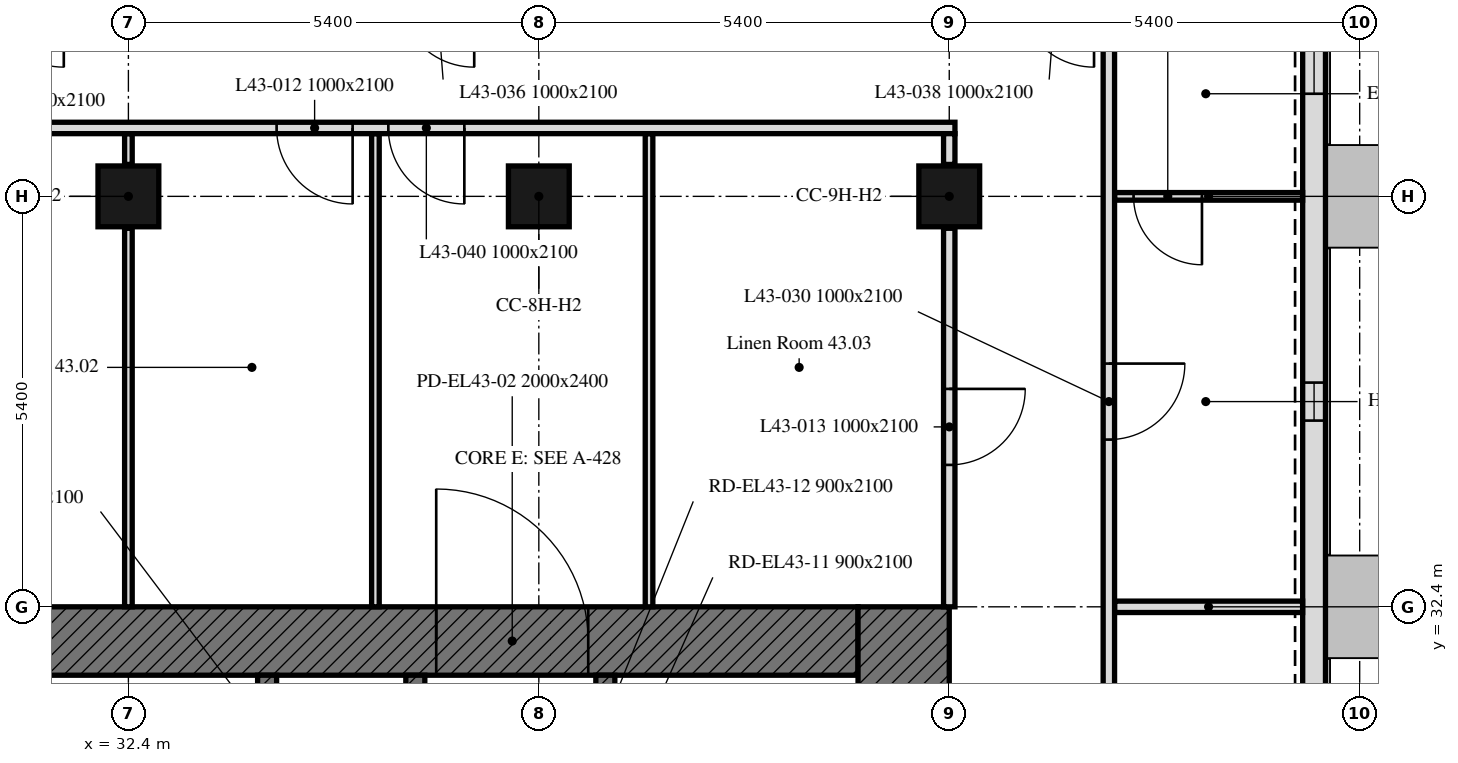
"""IFC4 building model, lengths in metres.
Left out: names, types, materials, properties, quantities, classifications, styles, units other than length and angle.
Written with IfcOpenShell. Run it as: python <this file> out.ifc"""

import sys

from ifc_helpers import new_model, si_unit, direction, frame, frame_2d, origin, origin_2d, place, context, subcontext, project, spatial, rectangle, extrude, element, fill, save


model = new_model("IFC4")
c1 = context("Model", 3, precision=1e-05, world=origin(), true_north=direction((0.0, 1.0)))
c2 = subcontext(c1, "Body", "Model", "MODEL_VIEW")
j1 = project(units=[si_unit("LENGTHUNIT", "METRE"), si_unit("PLANEANGLEUNIT", "RADIAN")], contexts=[c1])
p1 = place(None, origin())
s1 = spatial("IfcSite", under=j1, at=p1, CompositionType="ELEMENT")
p2 = place(p1, origin())
s2 = spatial("IfcBuilding", under=s1, at=p2, CompositionType="ELEMENT")
p3 = place(p2, frame((0.0, 0.0, 180.7)))
s3 = spatial("IfcBuildingStorey", under=s2, at=p3, CompositionType="ELEMENT", Elevation=180.7)
for number, where, z_axis, x_axis in (
    (1, (32.4, 37.8, 0.0), (0.0, 0.0, 1.0), (1.0, 0.0, 0.0)),
    (2, (37.8, 37.8, 0.0), (0.0, 0.0, 1.0), (1.0, 0.0, 0.0)),
    (3, (43.2, 37.8, 0.0), (0.0, 0.0, 1.0), (1.0, 0.0, 0.0)),
):
    element("IfcColumn", number, at=place(p3, frame(where, z_axis=z_axis, x_axis=x_axis)), inside=s3, PredefinedType="COLUMN", context=c2, shape_type="SweptSolid", body=[
        extrude(rectangle(XDim=0.8, YDim=0.8, at=origin_2d()), origin(), (0.0, 0.0, 1.0), 3.0),
    ])
p4 = place(p3, frame((48.0, 10.986, 0.0), z_axis=(0.0, 0.0, 1.0), x_axis=(0.0, 1.0, 0.0)))
e4 = element("IfcWall", 4, at=p4, inside=s3, PredefinedType="SOLIDWALL", context=c2, shape_type="SweptSolid", body=[
    extrude(rectangle(XDim=32.027, YDim=0.3, at=frame_2d((16.014, 0.0))), origin(), (0.0, 0.0, 1.0), 3.0),
])
p5 = place(p4, frame((1.164, 0.0, 0.9)))
e5 = element("IfcOpeningElement", 5, at=p5, cuts=e4, PredefinedType="OPENING", context=c2, shape_type="SweptSolid", body=[
    extrude(rectangle(XDim=1.1, YDim=1.7, at=frame_2d((0.55, 0.85))), frame((0.0, 0.16, 0.0), z_axis=(0.0, -1.0, 0.0), x_axis=(1.0, 0.0, 0.0)), (0.0, 0.0, 1.0), 0.32),
])
p6 = place(p4, frame((2.764, 0.0, 0.9)))
e6 = element("IfcOpeningElement", 6, at=p6, cuts=e4, PredefinedType="OPENING", context=c2, shape_type="SweptSolid", body=[
    extrude(rectangle(XDim=1.1, YDim=1.7, at=frame_2d((0.55, 0.85))), frame((0.0, 0.16, 0.0), z_axis=(0.0, -1.0, 0.0), x_axis=(1.0, 0.0, 0.0)), (0.0, 0.0, 1.0), 0.32),
])
p7 = place(p4, frame((7.664, 0.0, 0.9)))
e7 = element("IfcOpeningElement", 7, at=p7, cuts=e4, PredefinedType="OPENING", context=c2, shape_type="SweptSolid", body=[
    extrude(rectangle(XDim=0.5, YDim=1.7, at=frame_2d((0.25, 0.85))), frame((0.0, 0.16, 0.0), z_axis=(0.0, -1.0, 0.0), x_axis=(1.0, 0.0, 0.0)), (0.0, 0.0, 1.0), 0.32),
])
p8 = place(p4, frame((13.064, 0.0, 0.9)))
e8 = element("IfcOpeningElement", 8, at=p8, cuts=e4, PredefinedType="OPENING", context=c2, shape_type="SweptSolid", body=[
    extrude(rectangle(XDim=0.5, YDim=1.7, at=frame_2d((0.25, 0.85))), frame((0.0, 0.16, 0.0), z_axis=(0.0, -1.0, 0.0), x_axis=(1.0, 0.0, 0.0)), (0.0, 0.0, 1.0), 0.32),
])
p9 = place(p4, frame((18.464, 0.0, 0.9)))
e9 = element("IfcOpeningElement", 9, at=p9, cuts=e4, PredefinedType="OPENING", context=c2, shape_type="SweptSolid", body=[
    extrude(rectangle(XDim=0.5, YDim=1.7, at=frame_2d((0.25, 0.85))), frame((0.0, 0.16, 0.0), z_axis=(0.0, -1.0, 0.0), x_axis=(1.0, 0.0, 0.0)), (0.0, 0.0, 1.0), 0.32),
])
p10 = place(p4, frame((23.864, 0.0, 0.9)))
e10 = element("IfcOpeningElement", 10, at=p10, cuts=e4, PredefinedType="OPENING", context=c2, shape_type="SweptSolid", body=[
    extrude(rectangle(XDim=0.5, YDim=1.7, at=frame_2d((0.25, 0.85))), frame((0.0, 0.16, 0.0), z_axis=(0.0, -1.0, 0.0), x_axis=(1.0, 0.0, 0.0)), (0.0, 0.0, 1.0), 0.32),
])
p11 = place(p4, frame((28.164, 0.0, 0.9)))
e11 = element("IfcOpeningElement", 11, at=p11, cuts=e4, PredefinedType="OPENING", context=c2, shape_type="SweptSolid", body=[
    extrude(rectangle(XDim=1.1, YDim=1.7, at=frame_2d((0.55, 0.85))), frame((0.0, 0.16, 0.0), z_axis=(0.0, -1.0, 0.0), x_axis=(1.0, 0.0, 0.0)), (0.0, 0.0, 1.0), 0.32),
])
p12 = place(p4, frame((29.764, 0.0, 0.9)))
e12 = element("IfcOpeningElement", 12, at=p12, cuts=e4, PredefinedType="OPENING", context=c2, shape_type="SweptSolid", body=[
    extrude(rectangle(XDim=1.1, YDim=1.7, at=frame_2d((0.55, 0.85))), frame((0.0, 0.16, 0.0), z_axis=(0.0, -1.0, 0.0), x_axis=(1.0, 0.0, 0.0)), (0.0, 0.0, 1.0), 0.32),
])
p13 = place(p3, frame((30.9, 31.95, 0.0), z_axis=(0.0, 0.0, 1.0), x_axis=(1.0, 0.0, 0.0)))
e13 = element("IfcWall", 13, at=p13, inside=s3, PredefinedType="SOLIDWALL", context=c2, shape_type="SweptSolid", body=[
    extrude(rectangle(XDim=11.1, YDim=0.9, at=frame_2d((5.55, 0.0))), origin(), (0.0, 0.0, 1.0), 3.0),
])
p14 = place(p13, frame((5.55, 0.0, 0.0)))
e14 = element("IfcOpeningElement", 14, at=p14, cuts=e13, PredefinedType="OPENING", context=c2, shape_type="SweptSolid", body=[
    extrude(rectangle(XDim=2.0, YDim=2.4, at=frame_2d((1.0, 1.2))), frame((0.0, 0.45, 0.0), z_axis=(0.0, -1.0, 0.0), x_axis=(1.0, 0.0, 0.0)), (0.0, 0.0, 1.0), 0.9),
])
p15 = place(p3, frame((42.6, 32.4, 0.0), z_axis=(0.0, 0.0, 1.0), x_axis=(0.0, -1.0, 0.0)))
e15 = element("IfcWall", 15, at=p15, inside=s3, PredefinedType="SOLIDWALL", context=c2, shape_type="SweptSolid", body=[
    extrude(rectangle(XDim=16.2, YDim=1.2, at=frame_2d((8.1, 0.0))), origin(), (0.0, 0.0, 1.0), 3.0),
])
p16 = place(p3, frame((38.675, 17.1, 0.0), z_axis=(0.0, 0.0, 1.0), x_axis=(0.0, 1.0, 0.0)))
e16 = element("IfcWall", 16, at=p16, inside=s3, PredefinedType="SOLIDWALL", context=c2, shape_type="SweptSolid", body=[
    extrude(rectangle(XDim=14.4, YDim=0.25, at=frame_2d((7.2, 0.0))), origin(), (0.0, 0.0, 1.0), 3.0),
])
p17 = place(p16, frame((4.6, 0.0, 0.0)))
e17 = element("IfcOpeningElement", 17, at=p17, cuts=e16, PredefinedType="OPENING", context=c2, shape_type="SweptSolid", body=[
    extrude(rectangle(XDim=1.0, YDim=2.1, at=frame_2d((0.5, 1.05))), frame((0.0, 0.125, 0.0), z_axis=(0.0, -1.0, 0.0), x_axis=(1.0, 0.0, 0.0)), (0.0, 0.0, 1.0), 0.25),
])
p18 = place(p16, frame((7.062, 0.0, 0.0)))
e18 = element("IfcOpeningElement", 18, at=p18, cuts=e16, PredefinedType="OPENING", context=c2, shape_type="SweptSolid", body=[
    extrude(rectangle(XDim=1.2, YDim=2.1, at=frame_2d((0.6, 1.05))), frame((0.0, 0.125, 0.0), z_axis=(0.0, -1.0, 0.0), x_axis=(1.0, 0.0, 0.0)), (0.0, 0.0, 1.0), 0.25),
])
p19 = place(p16, frame((9.472, 0.0, 0.0)))
e19 = element("IfcOpeningElement", 19, at=p19, cuts=e16, PredefinedType="OPENING", context=c2, shape_type="SweptSolid", body=[
    extrude(rectangle(XDim=0.9, YDim=2.1, at=frame_2d((0.45, 1.05))), frame((0.0, 0.125, 0.0), z_axis=(0.0, -1.0, 0.0), x_axis=(1.0, 0.0, 0.0)), (0.0, 0.0, 1.0), 0.25),
])
p20 = place(p16, frame((10.779, 0.0, 0.0)))
e20 = element("IfcOpeningElement", 20, at=p20, cuts=e16, PredefinedType="OPENING", context=c2, shape_type="SweptSolid", body=[
    extrude(rectangle(XDim=0.9, YDim=2.1, at=frame_2d((0.45, 1.05))), frame((0.0, 0.125, 0.0), z_axis=(0.0, -1.0, 0.0), x_axis=(1.0, 0.0, 0.0)), (0.0, 0.0, 1.0), 0.25),
])
p21 = place(p16, frame((12.048, 0.0, 0.0)))
e21 = element("IfcOpeningElement", 21, at=p21, cuts=e16, PredefinedType="OPENING", context=c2, shape_type="SweptSolid", body=[
    extrude(rectangle(XDim=0.9, YDim=2.1, at=frame_2d((0.45, 1.05))), frame((0.0, 0.125, 0.0), z_axis=(0.0, -1.0, 0.0), x_axis=(1.0, 0.0, 0.0)), (0.0, 0.0, 1.0), 0.25),
])
p22 = place(p16, frame((13.354, 0.0, 0.0)))
e22 = element("IfcOpeningElement", 22, at=p22, cuts=e16, PredefinedType="OPENING", context=c2, shape_type="SweptSolid", body=[
    extrude(rectangle(XDim=0.9, YDim=2.1, at=frame_2d((0.45, 1.05))), frame((0.0, 0.125, 0.0), z_axis=(0.0, -1.0, 0.0), x_axis=(1.0, 0.0, 0.0)), (0.0, 0.0, 1.0), 0.25),
])
p23 = place(p3, frame((34.225, 17.1, 0.0), z_axis=(0.0, 0.0, 1.0), x_axis=(0.0, 1.0, 0.0)))
e23 = element("IfcWall", 23, at=p23, inside=s3, PredefinedType="SOLIDWALL", context=c2, shape_type="SweptSolid", body=[
    extrude(rectangle(XDim=14.4, YDim=0.25, at=frame_2d((7.2, 0.0))), origin(), (0.0, 0.0, 1.0), 3.0),
])
p24 = place(p23, frame((13.15, 0.0, 0.0)))
e24 = element("IfcOpeningElement", 24, at=p24, cuts=e23, PredefinedType="OPENING", context=c2, shape_type="SweptSolid", body=[
    extrude(rectangle(XDim=1.0, YDim=2.1, at=frame_2d((0.5, 1.05))), frame((0.0, 0.125, 0.0), z_axis=(0.0, -1.0, 0.0), x_axis=(1.0, 0.0, 0.0)), (0.0, 0.0, 1.0), 0.25),
])
p25 = place(p23, frame((0.6, 0.0, 0.0)))
e25 = element("IfcOpeningElement", 25, at=p25, cuts=e23, PredefinedType="OPENING", context=c2, shape_type="SweptSolid", body=[
    extrude(rectangle(XDim=1.1, YDim=2.1, at=frame_2d((0.55, 1.05))), frame((0.0, 0.125, 0.0), z_axis=(0.0, -1.0, 0.0), x_axis=(1.0, 0.0, 0.0)), (0.0, 0.0, 1.0), 0.25),
])
p26 = place(p23, frame((3.25, 0.0, 0.0)))
e26 = element("IfcOpeningElement", 26, at=p26, cuts=e23, PredefinedType="OPENING", context=c2, shape_type="SweptSolid", body=[
    extrude(rectangle(XDim=0.9, YDim=2.1, at=frame_2d((0.45, 1.05))), frame((0.0, 0.125, 0.0), z_axis=(0.0, -1.0, 0.0), x_axis=(1.0, 0.0, 0.0)), (0.0, 0.0, 1.0), 0.25),
])
p27 = place(p3, frame((36.175, 29.4, 0.0), z_axis=(0.0, 0.0, 1.0), x_axis=(0.0, 1.0, 0.0)))
e27 = element("IfcWall", 27, at=p27, inside=s3, PredefinedType="SOLIDWALL", context=c2, shape_type="SweptSolid", body=[
    extrude(rectangle(XDim=2.1, YDim=0.25, at=frame_2d((1.05, 0.0))), origin(), (0.0, 0.0, 1.0), 3.0),
])
p28 = place(p27, frame((0.5, 0.0, 0.0)))
e28 = element("IfcOpeningElement", 28, at=p28, cuts=e27, PredefinedType="OPENING", context=c2, shape_type="SweptSolid", body=[
    extrude(rectangle(XDim=1.0, YDim=2.1, at=frame_2d((0.5, 1.05))), frame((0.0, 0.125, 0.0), z_axis=(0.0, -1.0, 0.0), x_axis=(1.0, 0.0, 0.0)), (0.0, 0.0, 1.0), 0.25),
])
p29 = place(p3, frame((45.375, 32.4, 0.0), z_axis=(0.0, 0.0, 1.0), x_axis=(1.0, 0.0, 0.0)))
e29 = element("IfcWall", 29, at=p29, inside=s3, PredefinedType="PARTITIONING", context=c2, shape_type="SweptSolid", body=[
    extrude(rectangle(XDim=2.474, YDim=0.15, at=frame_2d((1.237, 0.0))), origin(), (0.0, 0.0, 1.0), 2.4),
])
p30 = place(p3, frame((47.849, 37.8, 0.0), z_axis=(0.0, 0.0, 1.0), x_axis=(-1.0, 0.0, 0.0)))
e30 = element("IfcWall", 30, at=p30, inside=s3, PredefinedType="PARTITIONING", context=c2, shape_type="SweptSolid", body=[
    extrude(rectangle(XDim=2.474, YDim=0.1, at=frame_2d((1.237, 0.0))), origin(), (0.0, 0.0, 1.0), 2.4),
])
p31 = place(p30, frame((1.324, 0.0, 0.0)))
e31 = element("IfcOpeningElement", 31, at=p31, cuts=e30, PredefinedType="OPENING", context=c2, shape_type="SweptSolid", body=[
    extrude(rectangle(XDim=0.9, YDim=2.1, at=frame_2d((0.45, 1.05))), frame((0.0, 0.05, 0.0), z_axis=(0.0, -1.0, 0.0), x_axis=(1.0, 0.0, 0.0)), (0.0, 0.0, 1.0), 0.1),
])
p32 = place(p3, frame((32.4, 32.4, 0.0), z_axis=(0.0, 0.0, 1.0), x_axis=(0.0, 1.0, 0.0)))
e32 = element("IfcWall", 32, at=p32, inside=s3, PredefinedType="PARTITIONING", context=c2, shape_type="SweptSolid", body=[
    extrude(rectangle(XDim=4.98, YDim=0.1, at=frame_2d((2.49, 0.0))), origin(), (0.0, 0.0, 1.0), 2.4),
])
p33 = place(p3, frame((32.4, 38.22, 0.0), z_axis=(0.0, 0.0, 1.0), x_axis=(0.0, 1.0, 0.0)))
e33 = element("IfcWall", 33, at=p33, inside=s3, PredefinedType="PARTITIONING", context=c2, shape_type="SweptSolid", body=[
    extrude(rectangle(XDim=0.405, YDim=0.1, at=frame_2d((0.203, 0.0))), origin(), (0.0, 0.0, 1.0), 2.4),
])
p34 = place(p3, frame((45.3, 40.425, 0.0), z_axis=(0.0, 0.0, 1.0), x_axis=(0.0, -1.0, 0.0)))
e34 = element("IfcWall", 34, at=p34, inside=s3, PredefinedType="PARTITIONING", context=c2, shape_type="SweptSolid", body=[
    extrude(rectangle(XDim=13.35, YDim=0.15, at=frame_2d((6.675, 0.0))), origin(), (0.0, 0.0, 1.0), 2.4),
])
p35 = place(p34, frame((10.225, 0.0, 0.0)))
e35 = element("IfcOpeningElement", 35, at=p35, cuts=e34, PredefinedType="OPENING", context=c2, shape_type="SweptSolid", body=[
    extrude(rectangle(XDim=1.0, YDim=2.1, at=frame_2d((0.5, 1.05))), frame((0.0, 0.075, 0.0), z_axis=(0.0, -1.0, 0.0), x_axis=(1.0, 0.0, 0.0)), (0.0, 0.0, 1.0), 0.15),
])
p36 = place(p34, frame((4.825, 0.0, 0.0)))
e36 = element("IfcOpeningElement", 36, at=p36, cuts=e34, PredefinedType="OPENING", context=c2, shape_type="SweptSolid", body=[
    extrude(rectangle(XDim=1.0, YDim=2.1, at=frame_2d((0.5, 1.05))), frame((0.0, 0.075, 0.0), z_axis=(0.0, -1.0, 0.0), x_axis=(1.0, 0.0, 0.0)), (0.0, 0.0, 1.0), 0.15),
])
for number, where, z_axis, x_axis in (
    (37, (39.25, 32.4, 0.0), (0.0, 0.0, 1.0), (0.0, 1.0, 0.0)),
    (38, (35.65, 38.625, 0.0), (0.0, 0.0, 1.0), (0.0, -1.0, 0.0)),
):
    element("IfcWall", number, at=place(p3, frame(where, z_axis=z_axis, x_axis=x_axis)), inside=s3, PredefinedType="PARTITIONING", context=c2, shape_type="SweptSolid", body=[
        extrude(rectangle(XDim=6.225, YDim=0.1, at=frame_2d((3.113, 0.0))), origin(), (0.0, 0.0, 1.0), 2.4),
    ])
p37 = place(p3, frame((43.275, 38.7, 0.0), z_axis=(0.0, 0.0, 1.0), x_axis=(-1.0, 0.0, 0.0)))
e39 = element("IfcWall", 39, at=p37, inside=s3, PredefinedType="PARTITIONING", context=c2, shape_type="SweptSolid", body=[
    extrude(rectangle(XDim=37.124, YDim=0.15, at=frame_2d((18.562, 0.0))), origin(), (0.0, 0.0, 1.0), 2.4),
])
p38 = place(p37, frame((18.475, 0.0, 0.0)))
e40 = element("IfcOpeningElement", 40, at=p38, cuts=e39, PredefinedType="OPENING", context=c2, shape_type="SweptSolid", body=[
    extrude(rectangle(XDim=1.0, YDim=2.1, at=frame_2d((0.5, 1.05))), frame((0.0, 0.075, 0.0), z_axis=(0.0, -1.0, 0.0), x_axis=(1.0, 0.0, 0.0)), (0.0, 0.0, 1.0), 0.15),
])
p39 = place(p37, frame((34.715, 0.0, 0.0)))
e41 = element("IfcOpeningElement", 41, at=p39, cuts=e39, PredefinedType="OPENING", context=c2, shape_type="SweptSolid", body=[
    extrude(rectangle(XDim=1.0, YDim=2.1, at=frame_2d((0.5, 1.05))), frame((0.0, 0.075, 0.0), z_axis=(0.0, -1.0, 0.0), x_axis=(1.0, 0.0, 0.0)), (0.0, 0.0, 1.0), 0.15),
])
p40 = place(p37, frame((7.925, 0.0, 0.0)))
e42 = element("IfcOpeningElement", 42, at=p40, cuts=e39, PredefinedType="OPENING", context=c2, shape_type="SweptSolid", body=[
    extrude(rectangle(XDim=1.0, YDim=2.1, at=frame_2d((0.5, 1.05))), frame((0.0, 0.075, 0.0), z_axis=(0.0, -1.0, 0.0), x_axis=(1.0, 0.0, 0.0)), (0.0, 0.0, 1.0), 0.15),
])
p41 = place(p37, frame((29.025, 0.0, 0.0)))
e43 = element("IfcOpeningElement", 43, at=p41, cuts=e39, PredefinedType="OPENING", context=c2, shape_type="SweptSolid", body=[
    extrude(rectangle(XDim=1.0, YDim=2.1, at=frame_2d((0.5, 1.05))), frame((0.0, 0.075, 0.0), z_axis=(0.0, -1.0, 0.0), x_axis=(1.0, 0.0, 0.0)), (0.0, 0.0, 1.0), 0.15),
])
p42 = place(p37, frame((30.495, 0.0, 0.0)))
e44 = element("IfcOpeningElement", 44, at=p42, cuts=e39, PredefinedType="OPENING", context=c2, shape_type="SweptSolid", body=[
    extrude(rectangle(XDim=1.0, YDim=2.1, at=frame_2d((0.5, 1.05))), frame((0.0, 0.075, 0.0), z_axis=(0.0, -1.0, 0.0), x_axis=(1.0, 0.0, 0.0)), (0.0, 0.0, 1.0), 0.15),
])
p43 = place(p37, frame((6.455, 0.0, 0.0)))
e45 = element("IfcOpeningElement", 45, at=p43, cuts=e39, PredefinedType="OPENING", context=c2, shape_type="SweptSolid", body=[
    extrude(rectangle(XDim=1.0, YDim=2.1, at=frame_2d((0.5, 1.05))), frame((0.0, 0.075, 0.0), z_axis=(0.0, -1.0, 0.0), x_axis=(1.0, 0.0, 0.0)), (0.0, 0.0, 1.0), 0.15),
])
p44 = place(p3, frame((43.2, 38.625, 0.0), z_axis=(0.0, 0.0, 1.0), x_axis=(0.0, -1.0, 0.0)))
e46 = element("IfcWall", 46, at=p44, inside=s3, PredefinedType="PARTITIONING", context=c2, shape_type="SweptSolid", body=[
    extrude(rectangle(XDim=0.405, YDim=0.15, at=frame_2d((0.203, 0.0))), origin(), (0.0, 0.0, 1.0), 3.0),
])
p45 = place(p3, frame((43.2, 37.38, 0.0), z_axis=(0.0, 0.0, 1.0), x_axis=(0.0, -1.0, 0.0)))
e47 = element("IfcWall", 47, at=p45, inside=s3, PredefinedType="PARTITIONING", context=c2, shape_type="SweptSolid", body=[
    extrude(rectangle(XDim=4.98, YDim=0.15, at=frame_2d((2.49, 0.0))), origin(), (0.0, 0.0, 1.0), 3.0),
])
p46 = place(p45, frame((2.113, 0.0, 0.0)))
e48 = element("IfcOpeningElement", 48, at=p46, cuts=e47, PredefinedType="OPENING", context=c2, shape_type="SweptSolid", body=[
    extrude(rectangle(XDim=1.0, YDim=2.1, at=frame_2d((0.5, 1.05))), frame((0.0, 0.075, 0.0), z_axis=(0.0, -1.0, 0.0), x_axis=(1.0, 0.0, 0.0)), (0.0, 0.0, 1.0), 0.15),
])
p47 = place(p10, origin())
e49 = element("IfcWindow", 49, at=p47, inside=s3, PartitioningType="SINGLE_PANEL", PredefinedType="WINDOW", context=c2, shape_type="SweptSolid", body=[
    extrude(rectangle(XDim=0.5, YDim=1.7, at=frame_2d((0.25, 0.85))), frame((0.0, 0.03, 0.0), z_axis=(0.0, -1.0, 0.0), x_axis=(1.0, 0.0, 0.0)), (0.0, 0.0, 1.0), 0.06),
])
fill(e10, e49)
p48 = place(p11, origin())
e50 = element("IfcWindow", 50, at=p48, inside=s3, PartitioningType="SINGLE_PANEL", PredefinedType="WINDOW", context=c2, shape_type="SweptSolid", body=[
    extrude(rectangle(XDim=1.1, YDim=1.7, at=frame_2d((0.55, 0.85))), frame((0.0, 0.03, 0.0), z_axis=(0.0, -1.0, 0.0), x_axis=(1.0, 0.0, 0.0)), (0.0, 0.0, 1.0), 0.06),
])
fill(e11, e50)
p49 = place(p14, origin())
e51 = element("IfcDoor", 51, at=p49, inside=s3, OperationType="DOUBLE_DOOR_SINGLE_SWING", PredefinedType="DOOR", context=c2, shape_type="SweptSolid", body=[
    extrude(rectangle(XDim=2.0, YDim=2.4, at=frame_2d((1.0, 1.2))), frame((0.0, 0.025, 0.0), z_axis=(0.0, -1.0, 0.0), x_axis=(1.0, 0.0, 0.0)), (0.0, 0.0, 1.0), 0.05),
])
fill(e14, e51)
p50 = place(p31, origin())
e52 = element("IfcDoor", 52, at=p50, inside=s3, OperationType="SINGLE_SWING_LEFT", PredefinedType="DOOR", context=c2, shape_type="SweptSolid", body=[
    extrude(rectangle(XDim=0.9, YDim=2.1, at=frame_2d((0.45, 1.05))), frame((0.0, 0.025, 0.0), z_axis=(0.0, -1.0, 0.0), x_axis=(1.0, 0.0, 0.0)), (0.0, 0.0, 1.0), 0.05),
])
fill(e31, e52)
p51 = place(p40, origin())
e53 = element("IfcDoor", 53, at=p51, inside=s3, OperationType="SINGLE_SWING_LEFT", PredefinedType="DOOR", context=c2, shape_type="SweptSolid", body=[
    extrude(rectangle(XDim=1.0, YDim=2.1, at=frame_2d((0.5, 1.05))), frame((0.0, 0.025, 0.0), z_axis=(0.0, -1.0, 0.0), x_axis=(1.0, 0.0, 0.0)), (0.0, 0.0, 1.0), 0.05),
])
fill(e42, e53)
p52 = place(p46, origin())
e54 = element("IfcDoor", 54, at=p52, inside=s3, OperationType="SINGLE_SWING_RIGHT", PredefinedType="DOOR", context=c2, shape_type="SweptSolid", body=[
    extrude(rectangle(XDim=1.0, YDim=2.1, at=frame_2d((0.5, 1.05))), frame((0.0, 0.025, 0.0), z_axis=(0.0, -1.0, 0.0), x_axis=(1.0, 0.0, 0.0)), (0.0, 0.0, 1.0), 0.05),
])
fill(e48, e54)
p53 = place(p36, origin())
e55 = element("IfcDoor", 55, at=p53, inside=s3, OperationType="SINGLE_SWING_LEFT", PredefinedType="DOOR", context=c2, shape_type="SweptSolid", body=[
    extrude(rectangle(XDim=1.0, YDim=2.1, at=frame_2d((0.5, 1.05))), frame((0.0, 0.025, 0.0), z_axis=(0.0, -1.0, 0.0), x_axis=(1.0, 0.0, 0.0)), (0.0, 0.0, 1.0), 0.05),
])
fill(e36, e55)
p54 = place(p43, origin())
e56 = element("IfcDoor", 56, at=p54, inside=s3, OperationType="SINGLE_SWING_LEFT", PredefinedType="DOOR", context=c2, shape_type="SweptSolid", body=[
    extrude(rectangle(XDim=1.0, YDim=2.1, at=frame_2d((0.5, 1.05))), frame((0.0, 0.025, 0.0), z_axis=(0.0, -1.0, 0.0), x_axis=(1.0, 0.0, 0.0)), (0.0, 0.0, 1.0), 0.05),
])
fill(e45, e56)
save(model, sys.argv[1])
